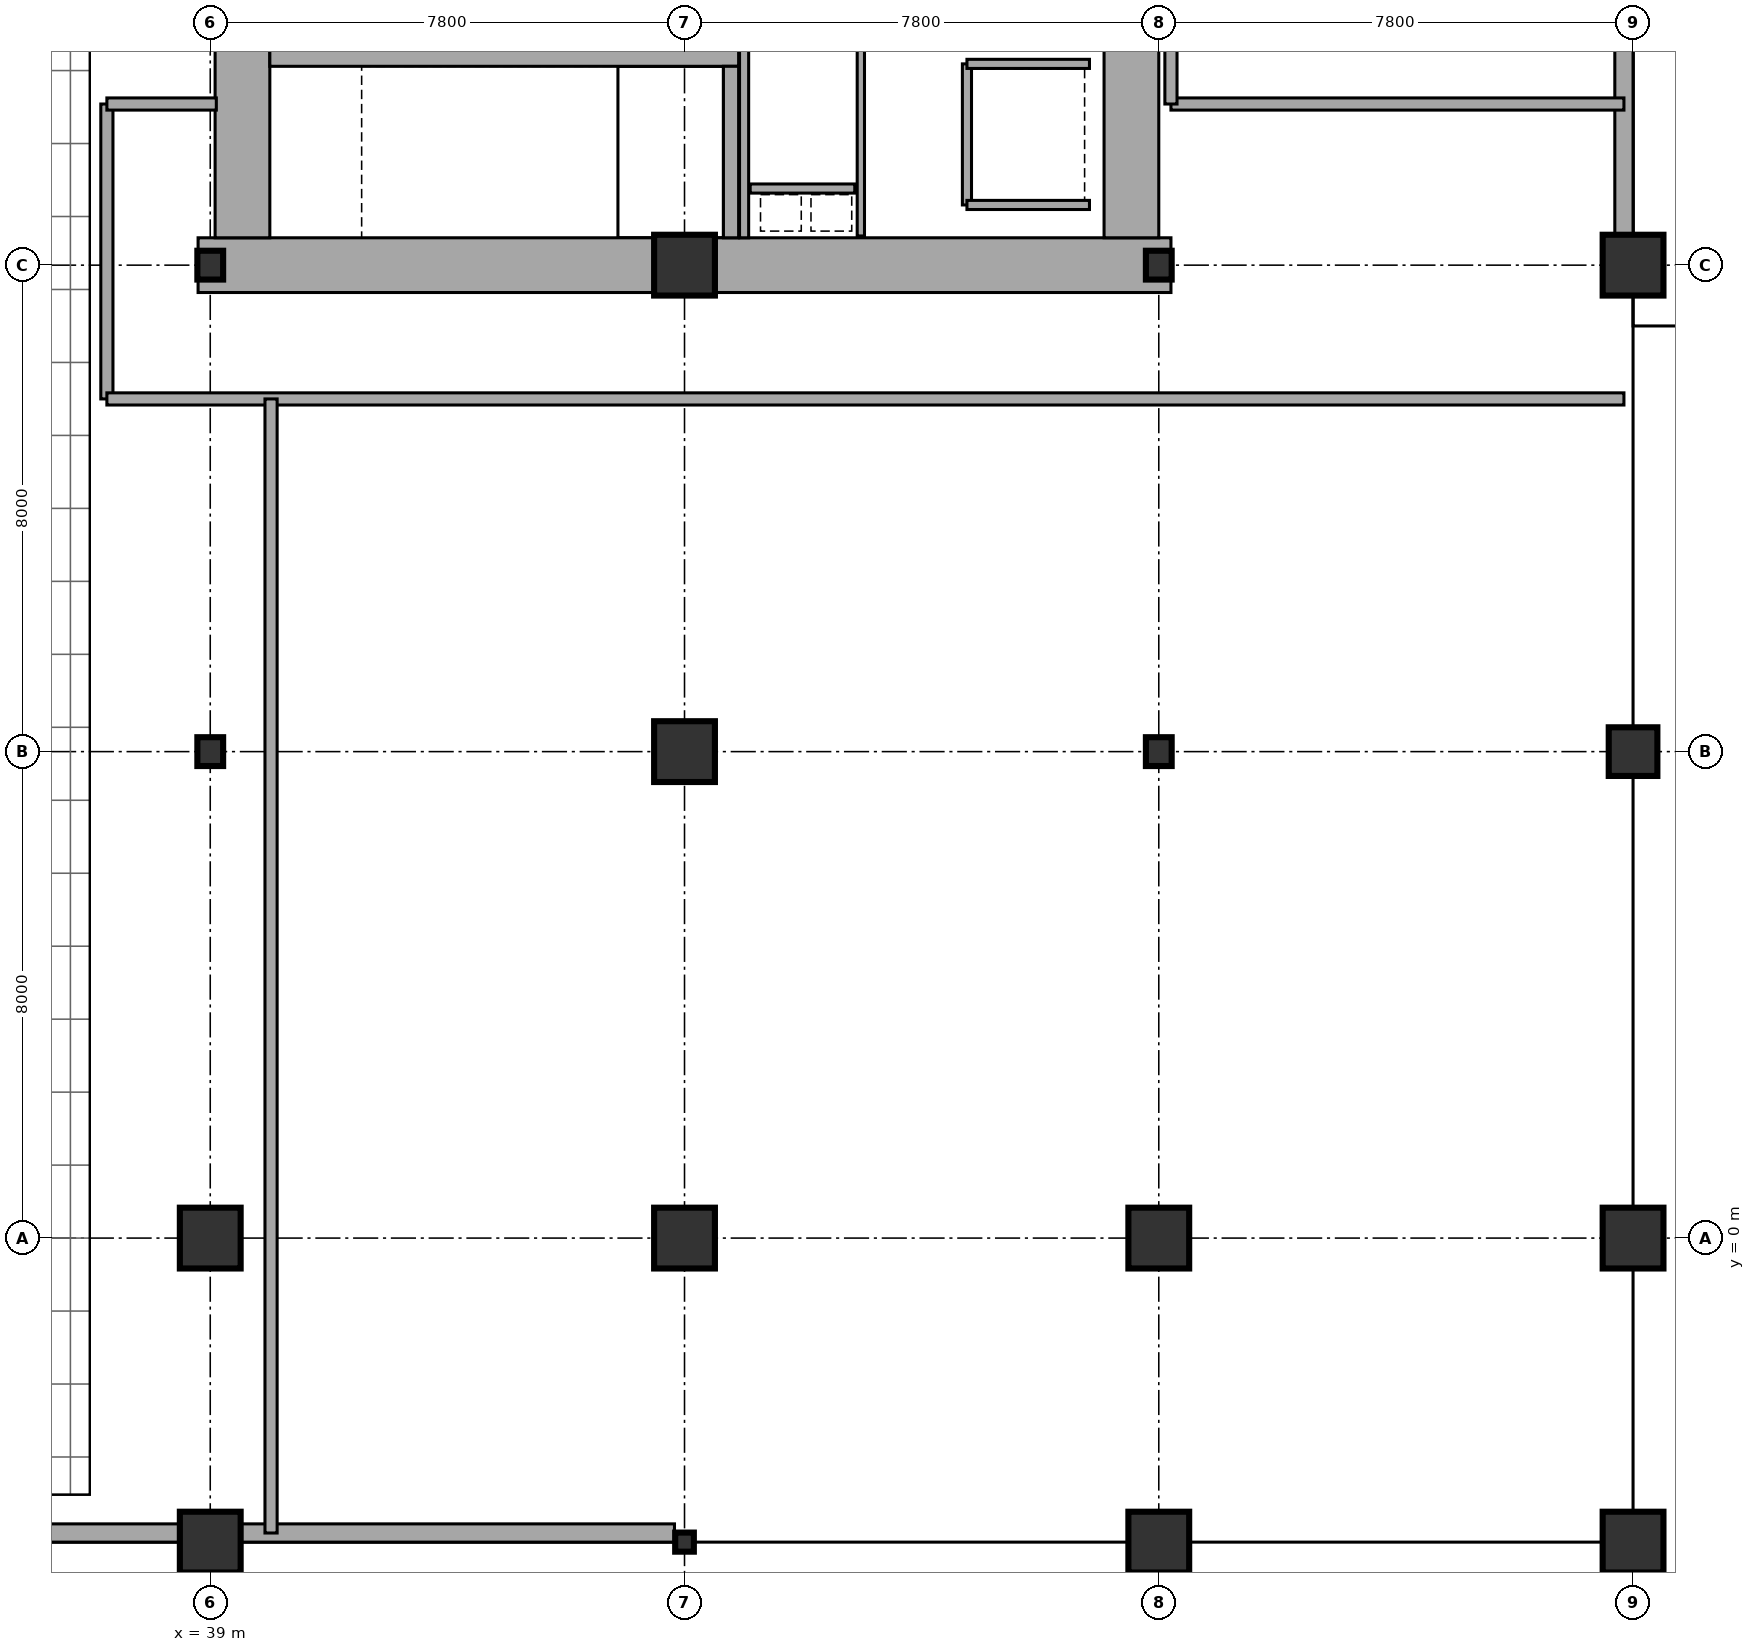
"""IFC4 building model, lengths in metres.
Left out: names, types, materials, properties, quantities, classifications, styles, units other than length and angle.
Written with IfcOpenShell. Run it as: python <this file> out.ifc"""

import sys

from ifc_helpers import new_model, si_unit, direction, frame, frame_2d, origin, origin_2d, place, context, subcontext, project, spatial, rectangle, i_section, extrude, element, fill, save


model = new_model("IFC4")
c1 = context("Model", 3, precision=1e-05, world=origin(), true_north=direction((0.0, 1.0)))
c2 = subcontext(c1, "Body", "Model", "MODEL_VIEW")
j1 = project(units=[si_unit("LENGTHUNIT", "METRE"), si_unit("PLANEANGLEUNIT", "RADIAN")], contexts=[c1])
p1 = place(None, origin())
s1 = spatial("IfcSite", under=j1, at=p1, CompositionType="ELEMENT")
p2 = place(p1, origin())
s2 = spatial("IfcBuilding", under=s1, at=p2, CompositionType="ELEMENT")
p3 = place(p2, origin())
s3 = spatial("IfcBuildingStorey", under=s2, at=p3, CompositionType="ELEMENT", Elevation=0.0)
p4 = place(p3, frame((38.8, 16.0, 0.0), z_axis=(0.0, 0.0, 1.0), x_axis=(1.0, 0.0, 0.0)))
e1 = element("IfcWall", 1, at=p4, inside=s3, PredefinedType="SHEAR", context=c2, shape_type="SweptSolid", body=[
    extrude(rectangle(XDim=16.0, YDim=0.9, at=frame_2d((8.0, 0.0))), origin(), (0.0, 0.0, 1.0), 5.12),
])
p5 = place(p3, frame((39.53, 16.45, 0.0), z_axis=(0.0, 0.0, 1.0), x_axis=(0.0, 1.0, 0.0)))
e2 = element("IfcWall", 2, at=p5, inside=s3, PredefinedType="SHEAR", context=c2, shape_type="SweptSolid", body=[
    extrude(rectangle(XDim=6.15, YDim=0.9, at=frame_2d((3.075, 0.0))), origin(), (0.0, 0.0, 1.0), 5.12),
])
p6 = place(p5, frame((0.35, 0.0, 0.0)))
e3 = element("IfcOpeningElement", 3, at=p6, cuts=e2, PredefinedType="OPENING", context=c2, shape_type="SweptSolid", body=[
    extrude(rectangle(XDim=1.1, YDim=2.15, at=frame_2d((0.55, 1.075))), frame((0.0, 0.46, 0.0), z_axis=(0.0, -1.0, 0.0), x_axis=(1.0, 0.0, 0.0)), (0.0, 0.0, 1.0), 0.92),
])
p7 = place(p3, frame((54.15, 16.45, 0.0), z_axis=(0.0, 0.0, 1.0), x_axis=(0.0, 1.0, 0.0)))
e4 = element("IfcWall", 4, at=p7, inside=s3, PredefinedType="SHEAR", context=c2, shape_type="SweptSolid", body=[
    extrude(rectangle(XDim=15.1, YDim=0.9, at=frame_2d((7.55, 0.0))), origin(), (0.0, 0.0, 1.0), 5.12),
])
p8 = place(p3, frame((39.98, 19.445, 0.0), z_axis=(0.0, 0.0, 1.0), x_axis=(1.0, 0.0, 0.0)))
e5 = element("IfcWall", 5, at=p8, inside=s3, PredefinedType="SHEAR", context=c2, shape_type="SweptSolid", body=[
    extrude(rectangle(XDim=7.71, YDim=0.35, at=frame_2d((3.855, 0.0))), origin(), (0.0, 0.0, 1.0), 5.12),
])
p9 = place(p8, frame((0.25, 0.0, 0.0)))
e6 = element("IfcOpeningElement", 6, at=p9, cuts=e5, PredefinedType="OPENING", context=c2, shape_type="SweptSolid", body=[
    extrude(rectangle(XDim=1.1, YDim=2.15, at=frame_2d((0.55, 1.075))), frame((0.0, 0.185, 0.0), z_axis=(0.0, -1.0, 0.0), x_axis=(1.0, 0.0, 0.0)), (0.0, 0.0, 1.0), 0.37),
])
p10 = place(p3, frame((47.565, 16.45, 0.0), z_axis=(0.0, 0.0, 1.0), x_axis=(0.0, 1.0, 0.0)))
e7 = element("IfcWall", 7, at=p10, inside=s3, PredefinedType="SHEAR", context=c2, shape_type="SweptSolid", body=[
    extrude(rectangle(XDim=2.82, YDim=0.25, at=frame_2d((1.41, 0.0))), origin(), (0.0, 0.0, 1.0), 5.12),
])
for number, where, z_axis, x_axis in (
    (8, (39.0, -5.0, 0.0), (0.0, 0.0, 1.0), (1.0, 0.0, 0.0)),
    (9, (39.0, 0.0, 0.0), (0.0, 0.0, 1.0), (1.0, 0.0, 0.0)),
):
    element("IfcColumn", number, at=place(p3, frame(where, z_axis=z_axis, x_axis=x_axis)), inside=s3, PredefinedType="COLUMN", context=c2, shape_type="SweptSolid", body=[
        extrude(rectangle(XDim=1.0, YDim=1.0, at=origin_2d()), origin(), (0.0, 0.0, 1.0), 5.395),
    ])
for number, where, z_axis, x_axis in (
    (10, (39.0, 8.0, 0.0), (0.0, 0.0, 1.0), (1.0, 0.0, 0.0)),
    (11, (39.0, 16.0, 0.0), (0.0, 0.0, 1.0), (1.0, 0.0, 0.0)),
):
    element("IfcColumn", number, at=place(p3, frame(where, z_axis=z_axis, x_axis=x_axis)), inside=s3, PredefinedType="COLUMN", context=c2, shape_type="SweptSolid", body=[
        extrude(i_section(OverallWidth=0.424, OverallDepth=0.474, WebThickness=0.048, FlangeThickness=0.077, at=origin_2d()), origin(), (0.0, 0.0, 1.0), 5.395),
    ])
p11 = place(p3, frame((46.8, -5.0, 0.0), z_axis=(0.0, 0.0, 1.0), x_axis=(1.0, 0.0, 0.0)))
e12 = element("IfcColumn", 12, at=p11, inside=s3, PredefinedType="COLUMN", context=c2, shape_type="SweptSolid", body=[
    extrude(i_section(OverallWidth=0.307, OverallDepth=0.314, WebThickness=0.011, FlangeThickness=0.019, at=origin_2d()), origin(), (0.0, 0.0, 1.0), 5.395),
])
for number, where, z_axis, x_axis in (
    (13, (46.8, 0.0, 0.0), (0.0, 0.0, 1.0), (1.0, 0.0, 0.0)),
    (14, (46.8, 8.0, 0.0), (0.0, 0.0, 1.0), (1.0, 0.0, 0.0)),
    (15, (46.8, 16.0, 0.0), (0.0, 0.0, 1.0), (1.0, 0.0, 0.0)),
    (16, (54.6, -5.0, 0.0), (0.0, 0.0, 1.0), (1.0, 0.0, 0.0)),
    (17, (54.6, 0.0, 0.0), (0.0, 0.0, 1.0), (1.0, 0.0, 0.0)),
):
    element("IfcColumn", number, at=place(p3, frame(where, z_axis=z_axis, x_axis=x_axis)), inside=s3, PredefinedType="COLUMN", context=c2, shape_type="SweptSolid", body=[
        extrude(rectangle(XDim=1.0, YDim=1.0, at=origin_2d()), origin(), (0.0, 0.0, 1.0), 5.395),
    ])
for number, where, z_axis, x_axis in (
    (18, (54.6, 8.0, 0.0), (0.0, 0.0, 1.0), (1.0, 0.0, 0.0)),
    (19, (54.6, 16.0, 0.0), (0.0, 0.0, 1.0), (1.0, 0.0, 0.0)),
):
    element("IfcColumn", number, at=place(p3, frame(where, z_axis=z_axis, x_axis=x_axis)), inside=s3, PredefinedType="COLUMN", context=c2, shape_type="SweptSolid", body=[
        extrude(i_section(OverallWidth=0.424, OverallDepth=0.474, WebThickness=0.048, FlangeThickness=0.077, at=origin_2d()), origin(), (0.0, 0.0, 1.0), 5.395),
    ])
for number, where, z_axis, x_axis in (
    (20, (62.4, -5.0, 0.0), (0.0, 0.0, 1.0), (1.0, 0.0, 0.0)),
    (21, (62.4, 0.0, 0.0), (0.0, 0.0, 1.0), (1.0, 0.0, 0.0)),
):
    element("IfcColumn", number, at=place(p3, frame(where, z_axis=z_axis, x_axis=x_axis)), inside=s3, PredefinedType="COLUMN", context=c2, shape_type="SweptSolid", body=[
        extrude(rectangle(XDim=1.0, YDim=1.0, at=origin_2d()), origin(), (0.0, 0.0, 1.0), 5.395),
    ])
p12 = place(p3, frame((62.4, 8.0, 0.0), z_axis=(0.0, 0.0, 1.0), x_axis=(1.0, 0.0, 0.0)))
e22 = element("IfcColumn", 22, at=p12, inside=s3, PredefinedType="COLUMN", context=c2, shape_type="SweptSolid", body=[
    extrude(rectangle(XDim=0.8, YDim=0.8, at=origin_2d()), origin(), (0.0, 0.0, 1.0), 5.395),
])
p13 = place(p3, frame((62.4, 16.0, 0.0), z_axis=(0.0, 0.0, 1.0), x_axis=(1.0, 0.0, 0.0)))
e23 = element("IfcColumn", 23, at=p13, inside=s3, PredefinedType="COLUMN", context=c2, shape_type="SweptSolid", body=[
    extrude(rectangle(XDim=1.0, YDim=1.0, at=origin_2d()), origin(), (0.0, 0.0, 1.0), 5.395),
])
p14 = place(p3, frame((39.51, -4.85, 0.0), z_axis=(0.0, 0.0, 1.0), x_axis=(1.0, 0.0, 0.0)))
e24 = element("IfcWall", 24, at=p14, inside=s3, PredefinedType="STANDARD", context=c2, shape_type="SweptSolid", body=[
    extrude(rectangle(XDim=7.125, YDim=0.3, at=frame_2d((3.562, 0.0))), origin(), (0.0, 0.0, 1.0), 4.415),
])
p15 = place(p14, frame((1.15, 0.0, 0.0)))
e25 = element("IfcOpeningElement", 25, at=p15, cuts=e24, PredefinedType="OPENING", context=c2, shape_type="SweptSolid", body=[
    extrude(rectangle(XDim=4.5, YDim=4.2, at=frame_2d((2.25, 2.1))), frame((0.0, 0.16, 0.0), z_axis=(0.0, -1.0, 0.0), x_axis=(1.0, 0.0, 0.0)), (0.0, 0.0, 1.0), 0.32),
])
p16 = place(p3, frame((31.71, -4.85, 0.0), z_axis=(0.0, 0.0, 1.0), x_axis=(1.0, 0.0, 0.0)))
e26 = element("IfcWall", 26, at=p16, inside=s3, PredefinedType="STANDARD", context=c2, shape_type="SweptSolid", body=[
    extrude(rectangle(XDim=6.78, YDim=0.3, at=frame_2d((3.39, 0.0))), origin(), (0.0, 0.0, 1.0), 4.415),
])
p17 = place(p16, frame((1.1, 0.0, 0.95)))
e27 = element("IfcOpeningElement", 27, at=p17, cuts=e26, PredefinedType="OPENING", context=c2, shape_type="SweptSolid", body=[
    extrude(rectangle(XDim=2.4, YDim=1.8, at=frame_2d((1.2, 0.9))), frame((0.0, 0.16, 0.0), z_axis=(0.0, -1.0, 0.0), x_axis=(1.0, 0.0, 0.0)), (0.0, 0.0, 1.0), 0.32),
])
p18 = place(p16, frame((4.2, 0.0, 0.95)))
e28 = element("IfcOpeningElement", 28, at=p18, cuts=e26, PredefinedType="OPENING", context=c2, shape_type="SweptSolid", body=[
    extrude(rectangle(XDim=1.2, YDim=1.5, at=frame_2d((0.6, 0.75))), frame((0.0, 0.16, 0.0), z_axis=(0.0, -1.0, 0.0), x_axis=(1.0, 0.0, 0.0)), (0.0, 0.0, 1.0), 0.32),
])
p19 = place(p3, frame((62.25, 16.51, 0.0), z_axis=(0.0, 0.0, 1.0), x_axis=(0.0, 1.0, 0.0)))
e29 = element("IfcWall", 29, at=p19, inside=s3, PredefinedType="STANDARD", context=c2, shape_type="SweptSolid", body=[
    extrude(rectangle(XDim=6.98, YDim=0.3, at=frame_2d((3.49, 0.0))), origin(), (0.0, 0.0, 1.0), 4.648),
])
p20 = place(p19, frame((0.22, 0.0, 0.0)))
e30 = element("IfcOpeningElement", 30, at=p20, cuts=e29, PredefinedType="OPENING", context=c2, shape_type="SweptSolid", body=[
    extrude(rectangle(XDim=1.8, YDim=2.2, at=frame_2d((0.9, 1.1))), frame((0.0, 0.16, 0.0), z_axis=(0.0, -1.0, 0.0), x_axis=(1.0, 0.0, 0.0)), (0.0, 0.0, 1.0), 0.32),
])
p21 = place(p19, frame((3.4, 0.0, 0.0)))
e31 = element("IfcOpeningElement", 31, at=p21, cuts=e29, PredefinedType="OPENING", context=c2, shape_type="SweptSolid", body=[
    extrude(rectangle(XDim=1.8, YDim=2.2, at=frame_2d((0.9, 1.1))), frame((0.0, 0.16, 0.0), z_axis=(0.0, -1.0, 0.0), x_axis=(1.0, 0.0, 0.0)), (0.0, 0.0, 1.0), 0.32),
])
p22 = place(p3, frame((51.445, 16.99, 0.0), z_axis=(0.0, 0.0, 1.0), x_axis=(0.0, 1.0, 0.0)))
e32 = element("IfcWall", 32, at=p22, inside=s3, PredefinedType="PARTITIONING", context=c2, shape_type="SweptSolid", body=[
    extrude(rectangle(XDim=2.32, YDim=0.15, at=frame_2d((1.16, 0.0))), origin(), (0.0, 0.0, 1.0), 5.12),
])
p23 = place(p22, frame((0.61, 0.0, 0.0)))
e33 = element("IfcOpeningElement", 33, at=p23, cuts=e32, PredefinedType="OPENING", context=c2, shape_type="SweptSolid", body=[
    extrude(rectangle(XDim=1.1, YDim=2.15, at=frame_2d((0.55, 1.075))), frame((0.0, 0.085, 0.0), z_axis=(0.0, -1.0, 0.0), x_axis=(1.0, 0.0, 0.0)), (0.0, 0.0, 1.0), 0.17),
])
for number, where, z_axis, x_axis in (
    (34, (51.445, 16.99, 0.0), (0.0, 0.0, 1.0), (1.0, 0.0, 0.0)),
    (35, (51.445, 19.31, 0.0), (0.0, 0.0, 1.0), (1.0, 0.0, 0.0)),
):
    element("IfcWall", number, at=place(p3, frame(where, z_axis=z_axis, x_axis=x_axis)), inside=s3, PredefinedType="PARTITIONING", context=c2, shape_type="SweptSolid", body=[
        extrude(rectangle(XDim=2.015, YDim=0.15, at=frame_2d((1.007, 0.0))), origin(), (0.0, 0.0, 1.0), 5.12),
    ])
p24 = place(p3, frame((47.88, 17.26, 0.0), z_axis=(0.0, 0.0, 1.0), x_axis=(1.0, 0.0, 0.0)))
e36 = element("IfcWall", 36, at=p24, inside=s3, PredefinedType="PARTITIONING", context=c2, shape_type="SweptSolid", body=[
    extrude(rectangle(XDim=1.72, YDim=0.15, at=frame_2d((0.86, 0.0))), origin(), (0.0, 0.0, 1.0), 5.12),
])
p25 = place(p24, frame((0.42, 0.0, 0.0)))
e37 = element("IfcOpeningElement", 37, at=p25, cuts=e36, PredefinedType="OPENING", context=c2, shape_type="SweptSolid", body=[
    extrude(rectangle(XDim=0.85, YDim=2.15, at=frame_2d((0.425, 1.075))), frame((0.0, 0.085, 0.0), z_axis=(0.0, -1.0, 0.0), x_axis=(1.0, 0.0, 0.0)), (0.0, 0.0, 1.0), 0.17),
])
p26 = place(p3, frame((47.78, 16.45, 0.0), z_axis=(0.0, 0.0, 1.0), x_axis=(0.0, 1.0, 0.0)))
e38 = element("IfcWall", 38, at=p26, inside=s3, PredefinedType="PARTITIONING", context=c2, shape_type="SweptSolid", body=[
    extrude(rectangle(XDim=5.975, YDim=0.15, at=frame_2d((2.988, 0.0))), origin(), (0.0, 0.0, 1.0), 5.12),
])
p27 = place(p3, frame((49.7, 16.48, 0.0), z_axis=(0.0, 0.0, 1.0), x_axis=(0.0, 1.0, 0.0)))
e39 = element("IfcWall", 39, at=p27, inside=s3, PredefinedType="PARTITIONING", context=c2, shape_type="SweptSolid", body=[
    extrude(rectangle(XDim=5.945, YDim=0.12, at=frame_2d((2.973, 0.0))), origin(), (0.0, 0.0, 1.0), 5.12),
])
p28 = place(p27, frame((3.35, 0.0, 0.0)))
e40 = element("IfcOpeningElement", 40, at=p28, cuts=e39, PredefinedType="OPENING", context=c2, shape_type="SweptSolid", body=[
    extrude(rectangle(XDim=0.95, YDim=2.15, at=frame_2d((0.475, 1.075))), frame((0.0, 0.07, 0.0), z_axis=(0.0, -1.0, 0.0), x_axis=(1.0, 0.0, 0.0)), (0.0, 0.0, 1.0), 0.14),
])
p29 = place(p3, frame((37.3, 13.8, 0.0), z_axis=(0.0, 0.0, 1.0), x_axis=(0.0, 1.0, 0.0)))
e41 = element("IfcWall", 41, at=p29, inside=s3, PredefinedType="SOLIDWALL", context=c2, shape_type="SweptSolid", body=[
    extrude(rectangle(XDim=4.85, YDim=0.2, at=frame_2d((2.425, 0.0))), origin(), (0.0, 0.0, 1.0), 3.688),
])
p30 = place(p3, frame((37.3, 18.65, 0.0), z_axis=(0.0, 0.0, 1.0), x_axis=(1.0, 0.0, 0.0)))
e42 = element("IfcWall", 42, at=p30, inside=s3, PredefinedType="SOLIDWALL", context=c2, shape_type="SweptSolid", body=[
    extrude(rectangle(XDim=1.8, YDim=0.2, at=frame_2d((0.9, 0.0))), origin(), (0.0, 0.0, 1.0), 4.415),
])
p31 = place(p3, frame((37.3, 13.8, 0.0), z_axis=(0.0, 0.0, 1.0), x_axis=(1.0, 0.0, 0.0)))
e43 = element("IfcWall", 43, at=p31, inside=s3, PredefinedType="SOLIDWALL", context=c2, shape_type="SweptSolid", body=[
    extrude(rectangle(XDim=24.95, YDim=0.2, at=frame_2d((12.475, 0.0))), origin(), (0.0, 0.0, 1.0), 4.415),
])
p32 = place(p3, frame((54.8, 18.65, 0.0), z_axis=(0.0, 0.0, 1.0), x_axis=(1.0, 0.0, 0.0)))
e44 = element("IfcWall", 44, at=p32, inside=s3, PredefinedType="SOLIDWALL", context=c2, shape_type="SweptSolid", body=[
    extrude(rectangle(XDim=7.45, YDim=0.2, at=frame_2d((3.725, 0.0))), origin(), (0.0, 0.0, 1.0), 5.12),
])
p33 = place(p3, frame((54.8, 18.65, 0.0), z_axis=(0.0, 0.0, 1.0), x_axis=(0.0, 1.0, 0.0)))
e45 = element("IfcWall", 45, at=p33, inside=s3, PredefinedType="SOLIDWALL", context=c2, shape_type="SweptSolid", body=[
    extrude(rectangle(XDim=9.95, YDim=0.2, at=frame_2d((4.975, 0.0))), origin(), (0.0, 0.0, 1.0), 4.338),
])
p34 = place(p3, frame((40.0, -4.85, 0.0), z_axis=(0.0, 0.0, 1.0), x_axis=(0.0, 1.0, 0.0)))
e46 = element("IfcWall", 46, at=p34, inside=s3, PredefinedType="SOLIDWALL", context=c2, shape_type="SweptSolid", body=[
    extrude(rectangle(XDim=18.65, YDim=0.2, at=frame_2d((9.325, 0.0))), origin(), (0.0, 0.0, 1.0), 4.338),
])
p35 = place(p34, frame((8.6, 0.0, 0.0)))
e47 = element("IfcOpeningElement", 47, at=p35, cuts=e46, PredefinedType="OPENING", context=c2, shape_type="SweptSolid", body=[
    extrude(rectangle(XDim=1.5, YDim=2.25, at=frame_2d((0.75, 1.125))), frame((0.0, 0.11, 0.0), z_axis=(0.0, -1.0, 0.0), x_axis=(1.0, 0.0, 0.0)), (0.0, 0.0, 1.0), 0.22),
])
p36 = place(p15, origin())
e48 = element("IfcDoor", 48, at=p36, inside=s3, OperationType="ROLLINGUP", PredefinedType="GATE", context=c2, shape_type="SweptSolid", body=[
    extrude(rectangle(XDim=4.5, YDim=4.2, at=frame_2d((2.25, 2.1))), frame((0.0, 0.025, 0.0), z_axis=(0.0, -1.0, 0.0), x_axis=(1.0, 0.0, 0.0)), (0.0, 0.0, 1.0), 0.05),
])
fill(e25, e48)
p37 = place(p18, origin())
e49 = element("IfcWindow", 49, at=p37, inside=s3, PartitioningType="SINGLE_PANEL", PredefinedType="WINDOW", context=c2, shape_type="SweptSolid", body=[
    extrude(rectangle(XDim=1.2, YDim=1.5, at=frame_2d((0.6, 0.75))), frame((0.0, 0.03, 0.0), z_axis=(0.0, -1.0, 0.0), x_axis=(1.0, 0.0, 0.0)), (0.0, 0.0, 1.0), 0.06),
])
fill(e28, e49)
p38 = place(p20, frame((1.8, 0.0, 0.0), z_axis=(0.0, 0.0, 1.0), x_axis=(-1.0, 0.0, 0.0)))
e50 = element("IfcDoor", 50, at=p38, inside=s3, OperationType="SINGLE_SWING_LEFT", PredefinedType="DOOR", context=c2, shape_type="SweptSolid", body=[
    extrude(rectangle(XDim=1.8, YDim=2.2, at=frame_2d((0.9, 1.1))), frame((0.0, 0.025, 0.0), z_axis=(0.0, -1.0, 0.0), x_axis=(1.0, 0.0, 0.0)), (0.0, 0.0, 1.0), 0.05),
])
fill(e30, e50)
p39 = place(p23, frame((1.1, 0.0, 0.0), z_axis=(0.0, 0.0, 1.0), x_axis=(-1.0, 0.0, 0.0)))
e51 = element("IfcDoor", 51, at=p39, inside=s3, OperationType="DOUBLE_DOOR_SLIDING", PredefinedType="DOOR", context=c2, shape_type="SweptSolid", body=[
    extrude(rectangle(XDim=1.1, YDim=2.15, at=frame_2d((0.55, 1.075))), frame((0.0, 0.025, 0.0), z_axis=(0.0, -1.0, 0.0), x_axis=(1.0, 0.0, 0.0)), (0.0, 0.0, 1.0), 0.05),
])
fill(e33, e51)
p40 = place(p25, origin())
e52 = element("IfcDoor", 52, at=p40, inside=s3, OperationType="SINGLE_SWING_LEFT", PredefinedType="TRAPDOOR", context=c2, shape_type="SweptSolid", body=[
    extrude(rectangle(XDim=0.85, YDim=2.15, at=frame_2d((0.425, 1.075))), frame((0.0, 0.025, 0.0), z_axis=(0.0, -1.0, 0.0), x_axis=(1.0, 0.0, 0.0)), (0.0, 0.0, 1.0), 0.05),
])
fill(e37, e52)
p41 = place(p35, origin())
e53 = element("IfcDoor", 53, at=p41, inside=s3, OperationType="SINGLE_SWING_LEFT", PredefinedType="DOOR", context=c2, shape_type="SweptSolid", body=[
    extrude(rectangle(XDim=1.5, YDim=2.25, at=frame_2d((0.75, 1.125))), frame((0.0, 0.025, 0.0), z_axis=(0.0, -1.0, 0.0), x_axis=(1.0, 0.0, 0.0)), (0.0, 0.0, 1.0), 0.05),
])
fill(e47, e53)
p42 = place(p9, frame((1.1, 0.0, 0.0), z_axis=(0.0, 0.0, 1.0), x_axis=(-1.0, 0.0, 0.0)))
e54 = element("IfcDoor", 54, at=p42, inside=s3, OperationType="SINGLE_SWING_RIGHT", PredefinedType="DOOR", context=c2, shape_type="SweptSolid", body=[
    extrude(rectangle(XDim=1.1, YDim=2.15, at=frame_2d((0.55, 1.075))), frame((0.0, 0.025, 0.0), z_axis=(0.0, -1.0, 0.0), x_axis=(1.0, 0.0, 0.0)), (0.0, 0.0, 1.0), 0.05),
])
fill(e6, e54)
p43 = place(p6, frame((1.1, 0.0, 0.0), z_axis=(0.0, 0.0, 1.0), x_axis=(-1.0, 0.0, 0.0)))
e55 = element("IfcDoor", 55, at=p43, inside=s3, OperationType="SINGLE_SWING_RIGHT", PredefinedType="DOOR", context=c2, shape_type="SweptSolid", body=[
    extrude(rectangle(XDim=1.1, YDim=2.15, at=frame_2d((0.55, 1.075))), frame((0.0, 0.025, 0.0), z_axis=(0.0, -1.0, 0.0), x_axis=(1.0, 0.0, 0.0)), (0.0, 0.0, 1.0), 0.05),
])
fill(e3, e55)
save(model, sys.argv[1])
